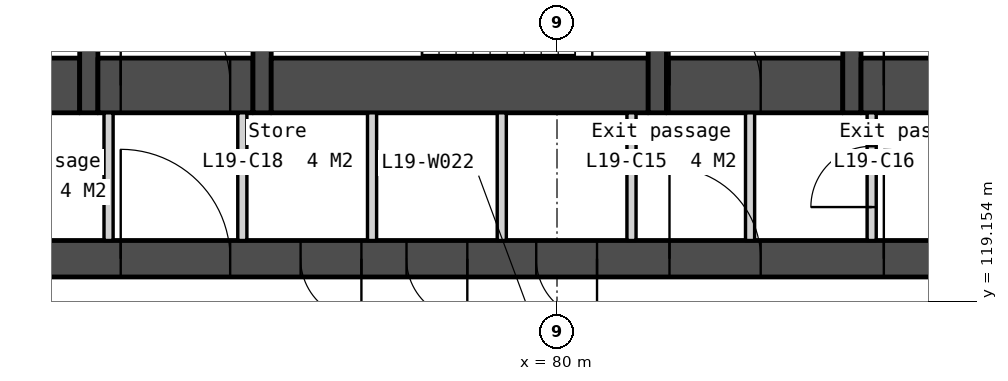
"""IFC4 building model, lengths in metres.
Left out: names, types, materials, properties, quantities, classifications, styles, units other than length and angle.
Written with IfcOpenShell. Run it as: python <this file> out.ifc"""

import sys

from ifc_helpers import new_model, si_unit, direction, frame, frame_2d, origin, place, context, subcontext, project, spatial, polyline, rectangle, outline, extrude, element, fill, save


model = new_model("IFC4")
c1 = context("Model", 3, precision=1e-05, world=origin(), true_north=direction((0.0, 1.0)))
c2 = subcontext(c1, "Body", "Model", "MODEL_VIEW")
j1 = project(units=[si_unit("LENGTHUNIT", "METRE"), si_unit("PLANEANGLEUNIT", "RADIAN")], contexts=[c1])
p1 = place(None, origin())
s1 = spatial("IfcSite", under=j1, at=p1, CompositionType="ELEMENT")
p2 = place(p1, origin())
s2 = spatial("IfcBuilding", under=s1, at=p2, CompositionType="ELEMENT")
p3 = place(p2, frame((0.0, 0.0, 81.8)))
s3 = spatial("IfcBuildingStorey", under=s2, at=p3, CompositionType="ELEMENT", Elevation=81.8)
p4 = place(p3, frame((66.0, 119.85, 0.0), z_axis=(0.0, 0.0, 1.0), x_axis=(1.0, 0.0, 0.0)))
e1 = element("IfcWall", 1, at=p4, inside=s3, PredefinedType="SOLIDWALL", context=c2, shape_type="SweptSolid", body=[
    extrude(rectangle(XDim=28.0, YDim=0.6, at=frame_2d((14.0, 0.0))), origin(), (0.0, 0.0, 1.0), 3.35),
])
p5 = place(p4, frame((6.825, 0.0, 0.0)))
e2 = element("IfcOpeningElement", 2, at=p5, cuts=e1, PredefinedType="OPENING", context=c2, shape_type="SweptSolid", body=[
    extrude(rectangle(XDim=1.8, YDim=2.1, at=frame_2d((0.9, 1.05))), frame((0.0, 0.31, 0.0), z_axis=(0.0, -1.0, 0.0), x_axis=(1.0, 0.0, 0.0)), (0.0, 0.0, 1.0), 0.62),
])
p6 = place(p4, frame((15.85, 0.0, 0.0)))
e3 = element("IfcOpeningElement", 3, at=p6, cuts=e1, PredefinedType="OPENING", context=c2, shape_type="SweptSolid", body=[
    extrude(rectangle(XDim=1.5, YDim=2.1, at=frame_2d((0.75, 1.05))), frame((0.0, 0.31, 0.0), z_axis=(0.0, -1.0, 0.0), x_axis=(1.0, 0.0, 0.0)), (0.0, 0.0, 1.0), 0.62),
])
p7 = place(p4, frame((19.375, 0.0, 0.0)))
e4 = element("IfcOpeningElement", 4, at=p7, cuts=e1, PredefinedType="OPENING", context=c2, shape_type="SweptSolid", body=[
    extrude(rectangle(XDim=1.8, YDim=2.1, at=frame_2d((0.9, 1.05))), frame((0.0, 0.31, 0.0), z_axis=(0.0, -1.0, 0.0), x_axis=(1.0, 0.0, 0.0)), (0.0, 0.0, 1.0), 0.62),
])
p8 = place(p4, frame((4.425, 0.0, 0.0)))
e5 = element("IfcOpeningElement", 5, at=p8, cuts=e1, PredefinedType="OPENING", context=c2, shape_type="SweptSolid", body=[
    extrude(rectangle(XDim=1.0, YDim=2.1, at=frame_2d((0.5, 1.05))), frame((0.0, 0.31, 0.0), z_axis=(0.0, -1.0, 0.0), x_axis=(1.0, 0.0, 0.0)), (0.0, 0.0, 1.0), 0.62),
])
p9 = place(p4, frame((9.783, 0.0, 0.0)))
e6 = element("IfcOpeningElement", 6, at=p9, cuts=e1, PredefinedType="OPENING", context=c2, shape_type="SweptSolid", body=[
    extrude(rectangle(XDim=1.0, YDim=2.1, at=frame_2d((0.5, 1.05))), frame((0.0, 0.31, 0.0), z_axis=(0.0, -1.0, 0.0), x_axis=(1.0, 0.0, 0.0)), (0.0, 0.0, 1.0), 0.62),
])
p10 = place(p4, frame((11.525, 0.0, 0.0)))
e7 = element("IfcOpeningElement", 7, at=p10, cuts=e1, PredefinedType="OPENING", context=c2, shape_type="SweptSolid", body=[
    extrude(rectangle(XDim=1.0, YDim=2.1, at=frame_2d((0.5, 1.05))), frame((0.0, 0.31, 0.0), z_axis=(0.0, -1.0, 0.0), x_axis=(1.0, 0.0, 0.0)), (0.0, 0.0, 1.0), 0.62),
])
p11 = place(p4, frame((13.658, 0.0, 0.0)))
e8 = element("IfcOpeningElement", 8, at=p11, cuts=e1, PredefinedType="OPENING", context=c2, shape_type="SweptSolid", body=[
    extrude(rectangle(XDim=1.0, YDim=2.1, at=frame_2d((0.5, 1.05))), frame((0.0, 0.31, 0.0), z_axis=(0.0, -1.0, 0.0), x_axis=(1.0, 0.0, 0.0)), (0.0, 0.0, 1.0), 0.62),
])
p12 = place(p4, frame((21.725, 0.0, 0.0)))
e9 = element("IfcOpeningElement", 9, at=p12, cuts=e1, PredefinedType="OPENING", context=c2, shape_type="SweptSolid", body=[
    extrude(rectangle(XDim=1.0, YDim=2.1, at=frame_2d((0.5, 1.05))), frame((0.0, 0.31, 0.0), z_axis=(0.0, -1.0, 0.0), x_axis=(1.0, 0.0, 0.0)), (0.0, 0.0, 1.0), 0.62),
])
p13 = place(p4, frame((23.425, 0.0, 0.0)))
e10 = element("IfcOpeningElement", 10, at=p13, cuts=e1, PredefinedType="OPENING", context=c2, shape_type="SweptSolid", body=[
    extrude(rectangle(XDim=1.0, YDim=2.1, at=frame_2d((0.5, 1.05))), frame((0.0, 0.31, 0.0), z_axis=(0.0, -1.0, 0.0), x_axis=(1.0, 0.0, 0.0)), (0.0, 0.0, 1.0), 0.62),
])
p14 = place(p3, frame((69.6, 122.7, 0.0), z_axis=(0.0, 0.0, 1.0), x_axis=(1.0, 0.0, 0.0)))
e11 = element("IfcWall", 11, at=p14, inside=s3, PredefinedType="SOLIDWALL", context=c2, shape_type="SweptSolid", body=[
    extrude(rectangle(XDim=2.55, YDim=0.9, at=frame_2d((1.275, 0.0))), origin(), (0.0, 0.0, 1.0), 3.35),
])
p15 = place(p3, frame((72.3, 133.95, 0.0), z_axis=(0.0, 0.0, 1.0), x_axis=(0.0, -1.0, 0.0)))
e12 = element("IfcWall", 12, at=p15, inside=s3, PredefinedType="SOLIDWALL", context=c2, shape_type="SweptSolid", body=[
    extrude(rectangle(XDim=11.7, YDim=0.3, at=frame_2d((5.85, 0.0))), origin(), (0.0, 0.0, 1.0), 3.35),
])
p16 = place(p15, frame((6.95, 0.0, 0.0)))
e13 = element("IfcOpeningElement", 13, at=p16, cuts=e12, PredefinedType="OPENING", context=c2, shape_type="SweptSolid", body=[
    extrude(rectangle(XDim=1.1, YDim=2.1, at=frame_2d((0.55, 1.05))), frame((0.0, 0.16, 0.0), z_axis=(0.0, -1.0, 0.0), x_axis=(1.0, 0.0, 0.0)), (0.0, 0.0, 1.0), 0.32),
])
p17 = place(p15, frame((9.35, 0.0, 0.0)))
e14 = element("IfcOpeningElement", 14, at=p17, cuts=e12, PredefinedType="OPENING", context=c2, shape_type="SweptSolid", body=[
    extrude(rectangle(XDim=0.9, YDim=2.1, at=frame_2d((0.45, 1.05))), frame((0.0, 0.16, 0.0), z_axis=(0.0, -1.0, 0.0), x_axis=(1.0, 0.0, 0.0)), (0.0, 0.0, 1.0), 0.32),
])
p18 = place(p15, frame((5.1, 0.0, 0.0)))
e15 = element("IfcOpeningElement", 15, at=p18, cuts=e12, PredefinedType="OPENING", context=c2, shape_type="SweptSolid", body=[
    extrude(rectangle(XDim=1.0, YDim=2.1, at=frame_2d((0.5, 1.05))), frame((0.0, 0.16, 0.0), z_axis=(0.0, -1.0, 0.0), x_axis=(1.0, 0.0, 0.0)), (0.0, 0.0, 1.0), 0.32),
])
p19 = place(p3, frame((72.45, 122.7, 0.0), z_axis=(0.0, 0.0, 1.0), x_axis=(1.0, 0.0, 0.0)))
e16 = element("IfcWall", 16, at=p19, inside=s3, PredefinedType="SOLIDWALL", context=c2, shape_type="SweptSolid", body=[
    extrude(rectangle(XDim=2.55, YDim=0.9, at=frame_2d((1.275, 0.0))), origin(), (0.0, 0.0, 1.0), 3.35),
])
p20 = place(p19, frame((0.375, 0.0, 0.0)))
e17 = element("IfcOpeningElement", 17, at=p20, cuts=e16, PredefinedType="OPENING", context=c2, shape_type="SweptSolid", body=[
    extrude(rectangle(XDim=1.8, YDim=2.1, at=frame_2d((0.9, 1.05))), frame((0.0, 0.46, 0.0), z_axis=(0.0, -1.0, 0.0), x_axis=(1.0, 0.0, 0.0)), (0.0, 0.0, 1.0), 0.92),
])
for number, where, z_axis, x_axis in (
    (18, (72.625, 122.25, 0.0), (0.0, 0.0, 1.0), (0.0, -1.0, 0.0)),
    (19, (74.825, 122.25, 0.0), (0.0, 0.0, 1.0), (0.0, -1.0, 0.0)),
):
    element("IfcWall", number, at=place(p3, frame(where, z_axis=z_axis, x_axis=x_axis)), inside=s3, PredefinedType="PARTITIONING", context=c2, shape_type="SweptSolid", body=[
        extrude(rectangle(XDim=2.1, YDim=0.15, at=frame_2d((1.05, 0.0))), origin(), (0.0, 0.0, 1.0), 3.35),
    ])
p21 = place(p3, frame((75.15, 133.95, 0.0), z_axis=(0.0, 0.0, 1.0), x_axis=(0.0, -1.0, 0.0)))
e20 = element("IfcWall", 20, at=p21, inside=s3, PredefinedType="SOLIDWALL", context=c2, shape_type="SweptSolid", body=[
    extrude(rectangle(XDim=11.7, YDim=0.3, at=frame_2d((5.85, 0.0))), origin(), (0.0, 0.0, 1.0), 3.35),
])
p22 = place(p3, frame((75.3, 122.7, 0.0), z_axis=(0.0, 0.0, 1.0), x_axis=(1.0, 0.0, 0.0)))
e21 = element("IfcWall", 21, at=p22, inside=s3, PredefinedType="SOLIDWALL", context=c2, shape_type="SweptSolid", body=[
    extrude(rectangle(XDim=6.2, YDim=0.9, at=frame_2d((3.1, 0.0))), origin(), (0.0, 0.0, 1.0), 3.35),
])
for number, where, z_axis, x_axis in (
    (22, (76.958, 122.25, 0.0), (0.0, 0.0, 1.0), (0.0, -1.0, 0.0)),
    (23, (79.092, 122.25, 0.0), (0.0, 0.0, 1.0), (0.0, -1.0, 0.0)),
    (24, (81.225, 122.25, 0.0), (0.0, 0.0, 1.0), (0.0, -1.0, 0.0)),
):
    element("IfcWall", number, at=place(p3, frame(where, z_axis=z_axis, x_axis=x_axis)), inside=s3, PredefinedType="PARTITIONING", context=c2, shape_type="SweptSolid", body=[
        extrude(rectangle(XDim=2.1, YDim=0.15, at=frame_2d((1.05, 0.0))), origin(), (0.0, 0.0, 1.0), 3.35),
    ])
p23 = place(p3, frame((81.65, 125.7, 0.0), z_axis=(0.0, 0.0, 1.0), x_axis=(0.0, -1.0, 0.0)))
e25 = element("IfcWall", 25, at=p23, inside=s3, PredefinedType="SOLIDWALL", context=c2, shape_type="SweptSolid", body=[
    extrude(rectangle(XDim=3.45, YDim=0.3, at=frame_2d((1.725, 0.0))), origin(), (0.0, 0.0, 1.0), 3.35),
])
p24 = place(p23, frame((0.75, 0.0, 0.0)))
e26 = element("IfcOpeningElement", 26, at=p24, cuts=e25, PredefinedType="OPENING", context=c2, shape_type="SweptSolid", body=[
    extrude(rectangle(XDim=1.0, YDim=2.1, at=frame_2d((0.5, 1.05))), frame((0.0, 0.16, 0.0), z_axis=(0.0, -1.0, 0.0), x_axis=(1.0, 0.0, 0.0)), (0.0, 0.0, 1.0), 0.32),
])
p25 = place(p3, frame((81.8, 122.7, 0.0), z_axis=(0.0, 0.0, 1.0), x_axis=(1.0, 0.0, 0.0)))
e27 = element("IfcWall", 27, at=p25, inside=s3, PredefinedType="SOLIDWALL", context=c2, shape_type="SweptSolid", body=[
    extrude(rectangle(XDim=2.9, YDim=0.9, at=frame_2d((1.45, 0.0))), origin(), (0.0, 0.0, 1.0), 3.35),
])
p26 = place(p25, frame((0.05, 0.0, 0.0)))
e28 = element("IfcOpeningElement", 28, at=p26, cuts=e27, PredefinedType="OPENING", context=c2, shape_type="SweptSolid", body=[
    extrude(rectangle(XDim=1.5, YDim=2.1, at=frame_2d((0.75, 1.05))), frame((0.0, 0.46, 0.0), z_axis=(0.0, -1.0, 0.0), x_axis=(1.0, 0.0, 0.0)), (0.0, 0.0, 1.0), 0.92),
])
p27 = place(p3, frame((83.175, 122.25, 0.0), z_axis=(0.0, 0.0, 1.0), x_axis=(0.0, -1.0, 0.0)))
e29 = element("IfcWall", 29, at=p27, inside=s3, PredefinedType="PARTITIONING", context=c2, shape_type="SweptSolid", body=[
    extrude(rectangle(XDim=2.1, YDim=0.15, at=frame_2d((1.05, 0.0))), origin(), (0.0, 0.0, 1.0), 3.35),
])
p28 = place(p3, frame((84.85, 133.95, 0.0), z_axis=(0.0, 0.0, 1.0), x_axis=(0.0, -1.0, 0.0)))
e30 = element("IfcWall", 30, at=p28, inside=s3, PredefinedType="SOLIDWALL", context=c2, shape_type="SweptSolid", body=[
    extrude(rectangle(XDim=11.7, YDim=0.3, at=frame_2d((5.85, 0.0))), origin(), (0.0, 0.0, 1.0), 3.35),
])
p29 = place(p3, frame((85.0, 122.7, 0.0), z_axis=(0.0, 0.0, 1.0), x_axis=(1.0, 0.0, 0.0)))
e31 = element("IfcWall", 31, at=p29, inside=s3, PredefinedType="SOLIDWALL", context=c2, shape_type="SweptSolid", body=[
    extrude(rectangle(XDim=2.55, YDim=0.9, at=frame_2d((1.275, 0.0))), origin(), (0.0, 0.0, 1.0), 3.35),
])
p30 = place(p29, frame((0.375, 0.0, 0.0)))
e32 = element("IfcOpeningElement", 32, at=p30, cuts=e31, PredefinedType="OPENING", context=c2, shape_type="SweptSolid", body=[
    extrude(rectangle(XDim=1.8, YDim=2.1, at=frame_2d((0.9, 1.05))), frame((0.0, 0.46, 0.0), z_axis=(0.0, -1.0, 0.0), x_axis=(1.0, 0.0, 0.0)), (0.0, 0.0, 1.0), 0.92),
])
p31 = place(p3, frame((85.175, 122.25, 0.0), z_axis=(0.0, 0.0, 1.0), x_axis=(0.0, -1.0, 0.0)))
e33 = element("IfcWall", 33, at=p31, inside=s3, PredefinedType="PARTITIONING", context=c2, shape_type="SweptSolid", body=[
    extrude(rectangle(XDim=2.1, YDim=0.15, at=frame_2d((1.05, 0.0))), origin(), (0.0, 0.0, 1.0), 3.35),
])
p32 = place(p31, frame((0.55, 0.0, 0.0)))
e34 = element("IfcOpeningElement", 34, at=p32, cuts=e33, PredefinedType="OPENING", context=c2, shape_type="SweptSolid", body=[
    extrude(rectangle(XDim=1.0, YDim=2.1, at=frame_2d((0.5, 1.05))), frame((0.0, 0.085, 0.0), z_axis=(0.0, -1.0, 0.0), x_axis=(1.0, 0.0, 0.0)), (0.0, 0.0, 1.0), 0.17),
])
p33 = place(p3, frame((56.073, 130.263, -0.45), z_axis=(0.0, 0.0, 1.0), x_axis=(0.500000478905, -0.866025127289, 0.0)))
e35 = element("IfcWall", 35, at=p33, inside=s3, PredefinedType="SOLIDWALL", context=c2, shape_type="SweptSolid", body=[
    extrude(outline(polyline([(42.643, 0.0), (42.643, 3.8), (0.0, 3.8), (0.0, 0.0), (42.643, 0.0)])), frame((0.0, 0.225, 0.0), z_axis=(0.0, -1.0, 0.0), x_axis=(1.0, 0.0, 0.0)), (0.0, 0.0, 1.0), 0.45),
])
p34 = place(p33, frame((2.814, 0.0, 1.35)))
e36 = element("IfcOpeningElement", 36, at=p34, cuts=e35, PredefinedType="OPENING", context=c2, shape_type="SweptSolid", body=[
    extrude(rectangle(XDim=1.2, YDim=1.5, at=frame_2d((0.6, 0.75))), frame((0.0, 0.235, 0.0), z_axis=(0.0, -1.0, 0.0), x_axis=(1.0, 0.0, 0.0)), (0.0, 0.0, 1.0), 0.47),
])
p35 = place(p33, frame((4.514, 0.0, 1.35)))
e37 = element("IfcOpeningElement", 37, at=p35, cuts=e35, PredefinedType="OPENING", context=c2, shape_type="SweptSolid", body=[
    extrude(rectangle(XDim=1.2, YDim=1.5, at=frame_2d((0.6, 0.75))), frame((0.0, 0.235, 0.0), z_axis=(0.0, -1.0, 0.0), x_axis=(1.0, 0.0, 0.0)), (0.0, 0.0, 1.0), 0.47),
])
p36 = place(p33, frame((11.343, 0.0, 1.35)))
e38 = element("IfcOpeningElement", 38, at=p36, cuts=e35, PredefinedType="OPENING", context=c2, shape_type="SweptSolid", body=[
    extrude(rectangle(XDim=1.2, YDim=1.5, at=frame_2d((0.6, 0.75))), frame((0.0, 0.235, 0.0), z_axis=(0.0, -1.0, 0.0), x_axis=(1.0, 0.0, 0.0)), (0.0, 0.0, 1.0), 0.47),
])
p37 = place(p33, frame((13.043, 0.0, 1.35)))
e39 = element("IfcOpeningElement", 39, at=p37, cuts=e35, PredefinedType="OPENING", context=c2, shape_type="SweptSolid", body=[
    extrude(rectangle(XDim=1.2, YDim=1.5, at=frame_2d((0.6, 0.75))), frame((0.0, 0.235, 0.0), z_axis=(0.0, -1.0, 0.0), x_axis=(1.0, 0.0, 0.0)), (0.0, 0.0, 1.0), 0.47),
])
p38 = place(p33, frame((19.872, 0.0, 1.35)))
e40 = element("IfcOpeningElement", 40, at=p38, cuts=e35, PredefinedType="OPENING", context=c2, shape_type="SweptSolid", body=[
    extrude(rectangle(XDim=1.2, YDim=1.5, at=frame_2d((0.6, 0.75))), frame((0.0, 0.235, 0.0), z_axis=(0.0, -1.0, 0.0), x_axis=(1.0, 0.0, 0.0)), (0.0, 0.0, 1.0), 0.47),
])
p39 = place(p33, frame((21.572, 0.0, 1.35)))
e41 = element("IfcOpeningElement", 41, at=p39, cuts=e35, PredefinedType="OPENING", context=c2, shape_type="SweptSolid", body=[
    extrude(rectangle(XDim=1.2, YDim=1.5, at=frame_2d((0.6, 0.75))), frame((0.0, 0.235, 0.0), z_axis=(0.0, -1.0, 0.0), x_axis=(1.0, 0.0, 0.0)), (0.0, 0.0, 1.0), 0.47),
])
p40 = place(p33, frame((28.4, 0.0, 1.35)))
e42 = element("IfcOpeningElement", 42, at=p40, cuts=e35, PredefinedType="OPENING", context=c2, shape_type="SweptSolid", body=[
    extrude(rectangle(XDim=1.2, YDim=1.5, at=frame_2d((0.6, 0.75))), frame((0.0, 0.235, 0.0), z_axis=(0.0, -1.0, 0.0), x_axis=(1.0, 0.0, 0.0)), (0.0, 0.0, 1.0), 0.47),
])
p41 = place(p33, frame((30.1, 0.0, 1.35)))
e43 = element("IfcOpeningElement", 43, at=p41, cuts=e35, PredefinedType="OPENING", context=c2, shape_type="SweptSolid", body=[
    extrude(rectangle(XDim=1.2, YDim=1.5, at=frame_2d((0.6, 0.75))), frame((0.0, 0.235, 0.0), z_axis=(0.0, -1.0, 0.0), x_axis=(1.0, 0.0, 0.0)), (0.0, 0.0, 1.0), 0.47),
])
p42 = place(p33, frame((36.929, 0.0, 1.35)))
e44 = element("IfcOpeningElement", 44, at=p42, cuts=e35, PredefinedType="OPENING", context=c2, shape_type="SweptSolid", body=[
    extrude(rectangle(XDim=1.2, YDim=1.5, at=frame_2d((0.6, 0.75))), frame((0.0, 0.235, 0.0), z_axis=(0.0, -1.0, 0.0), x_axis=(1.0, 0.0, 0.0)), (0.0, 0.0, 1.0), 0.47),
])
p43 = place(p33, frame((38.629, 0.0, 1.35)))
e45 = element("IfcOpeningElement", 45, at=p43, cuts=e35, PredefinedType="OPENING", context=c2, shape_type="SweptSolid", body=[
    extrude(rectangle(XDim=1.2, YDim=1.5, at=frame_2d((0.6, 0.75))), frame((0.0, 0.235, 0.0), z_axis=(0.0, -1.0, 0.0), x_axis=(1.0, 0.0, 0.0)), (0.0, 0.0, 1.0), 0.47),
])
p44 = place(p3, frame((82.605, 93.333, -0.45), z_axis=(0.0, 0.0, 1.0), x_axis=(0.500000478905, 0.866025127289, 0.0)))
e46 = element("IfcWall", 46, at=p44, inside=s3, PredefinedType="SOLIDWALL", context=c2, shape_type="SweptSolid", body=[
    extrude(outline(polyline([(42.643, 0.0), (42.643, 3.8), (0.0, 3.8), (0.0, 0.0), (42.643, 0.0)])), frame((0.0, 0.225, 0.0), z_axis=(0.0, -1.0, 0.0), x_axis=(1.0, 0.0, 0.0)), (0.0, 0.0, 1.0), 0.45),
])
p45 = place(p44, frame((2.814, 0.0, 1.35)))
e47 = element("IfcOpeningElement", 47, at=p45, cuts=e46, PredefinedType="OPENING", context=c2, shape_type="SweptSolid", body=[
    extrude(rectangle(XDim=1.2, YDim=1.5, at=frame_2d((0.6, 0.75))), frame((0.0, 0.235, 0.0), z_axis=(0.0, -1.0, 0.0), x_axis=(1.0, 0.0, 0.0)), (0.0, 0.0, 1.0), 0.47),
])
p46 = place(p44, frame((4.514, 0.0, 1.35)))
e48 = element("IfcOpeningElement", 48, at=p46, cuts=e46, PredefinedType="OPENING", context=c2, shape_type="SweptSolid", body=[
    extrude(rectangle(XDim=1.2, YDim=1.5, at=frame_2d((0.6, 0.75))), frame((0.0, 0.235, 0.0), z_axis=(0.0, -1.0, 0.0), x_axis=(1.0, 0.0, 0.0)), (0.0, 0.0, 1.0), 0.47),
])
p47 = place(p44, frame((11.343, 0.0, 1.35)))
e49 = element("IfcOpeningElement", 49, at=p47, cuts=e46, PredefinedType="OPENING", context=c2, shape_type="SweptSolid", body=[
    extrude(rectangle(XDim=1.2, YDim=1.5, at=frame_2d((0.6, 0.75))), frame((0.0, 0.235, 0.0), z_axis=(0.0, -1.0, 0.0), x_axis=(1.0, 0.0, 0.0)), (0.0, 0.0, 1.0), 0.47),
])
p48 = place(p44, frame((13.043, 0.0, 1.35)))
e50 = element("IfcOpeningElement", 50, at=p48, cuts=e46, PredefinedType="OPENING", context=c2, shape_type="SweptSolid", body=[
    extrude(rectangle(XDim=1.2, YDim=1.5, at=frame_2d((0.6, 0.75))), frame((0.0, 0.235, 0.0), z_axis=(0.0, -1.0, 0.0), x_axis=(1.0, 0.0, 0.0)), (0.0, 0.0, 1.0), 0.47),
])
p49 = place(p44, frame((19.872, 0.0, 1.35)))
e51 = element("IfcOpeningElement", 51, at=p49, cuts=e46, PredefinedType="OPENING", context=c2, shape_type="SweptSolid", body=[
    extrude(rectangle(XDim=1.2, YDim=1.5, at=frame_2d((0.6, 0.75))), frame((0.0, 0.235, 0.0), z_axis=(0.0, -1.0, 0.0), x_axis=(1.0, 0.0, 0.0)), (0.0, 0.0, 1.0), 0.47),
])
p50 = place(p44, frame((21.572, 0.0, 1.35)))
e52 = element("IfcOpeningElement", 52, at=p50, cuts=e46, PredefinedType="OPENING", context=c2, shape_type="SweptSolid", body=[
    extrude(rectangle(XDim=1.2, YDim=1.5, at=frame_2d((0.6, 0.75))), frame((0.0, 0.235, 0.0), z_axis=(0.0, -1.0, 0.0), x_axis=(1.0, 0.0, 0.0)), (0.0, 0.0, 1.0), 0.47),
])
p51 = place(p44, frame((28.4, 0.0, 1.35)))
e53 = element("IfcOpeningElement", 53, at=p51, cuts=e46, PredefinedType="OPENING", context=c2, shape_type="SweptSolid", body=[
    extrude(rectangle(XDim=1.2, YDim=1.5, at=frame_2d((0.6, 0.75))), frame((0.0, 0.235, 0.0), z_axis=(0.0, -1.0, 0.0), x_axis=(1.0, 0.0, 0.0)), (0.0, 0.0, 1.0), 0.47),
])
p52 = place(p44, frame((30.1, 0.0, 1.35)))
e54 = element("IfcOpeningElement", 54, at=p52, cuts=e46, PredefinedType="OPENING", context=c2, shape_type="SweptSolid", body=[
    extrude(rectangle(XDim=1.2, YDim=1.5, at=frame_2d((0.6, 0.75))), frame((0.0, 0.235, 0.0), z_axis=(0.0, -1.0, 0.0), x_axis=(1.0, 0.0, 0.0)), (0.0, 0.0, 1.0), 0.47),
])
p53 = place(p44, frame((36.929, 0.0, 1.35)))
e55 = element("IfcOpeningElement", 55, at=p53, cuts=e46, PredefinedType="OPENING", context=c2, shape_type="SweptSolid", body=[
    extrude(rectangle(XDim=1.2, YDim=1.5, at=frame_2d((0.6, 0.75))), frame((0.0, 0.235, 0.0), z_axis=(0.0, -1.0, 0.0), x_axis=(1.0, 0.0, 0.0)), (0.0, 0.0, 1.0), 0.47),
])
p54 = place(p44, frame((38.629, 0.0, 1.35)))
e56 = element("IfcOpeningElement", 56, at=p54, cuts=e46, PredefinedType="OPENING", context=c2, shape_type="SweptSolid", body=[
    extrude(rectangle(XDim=1.2, YDim=1.5, at=frame_2d((0.6, 0.75))), frame((0.0, 0.235, 0.0), z_axis=(0.0, -1.0, 0.0), x_axis=(1.0, 0.0, 0.0)), (0.0, 0.0, 1.0), 0.47),
])
p55 = place(p30, origin())
e57 = element("IfcDoor", 57, at=p55, inside=s3, OperationType="DOUBLE_DOOR_DOUBLE_SWING", PredefinedType="DOOR", context=c2, shape_type="SweptSolid", body=[
    extrude(rectangle(XDim=1.8, YDim=2.1, at=frame_2d((0.9, 1.05))), frame((0.0, 0.025, 0.0), z_axis=(0.0, -1.0, 0.0), x_axis=(1.0, 0.0, 0.0)), (0.0, 0.0, 1.0), 0.05),
])
fill(e32, e57)
p56 = place(p20, origin())
e58 = element("IfcDoor", 58, at=p56, inside=s3, OperationType="DOUBLE_DOOR_DOUBLE_SWING", PredefinedType="DOOR", context=c2, shape_type="SweptSolid", body=[
    extrude(rectangle(XDim=1.8, YDim=2.1, at=frame_2d((0.9, 1.05))), frame((0.0, 0.025, 0.0), z_axis=(0.0, -1.0, 0.0), x_axis=(1.0, 0.0, 0.0)), (0.0, 0.0, 1.0), 0.05),
])
fill(e17, e58)
p57 = place(p26, origin())
e59 = element("IfcDoor", 59, at=p57, inside=s3, OperationType="DOUBLE_DOOR_DOUBLE_SWING", PredefinedType="DOOR", context=c2, shape_type="SweptSolid", body=[
    extrude(rectangle(XDim=1.5, YDim=2.1, at=frame_2d((0.75, 1.05))), frame((0.0, 0.025, 0.0), z_axis=(0.0, -1.0, 0.0), x_axis=(1.0, 0.0, 0.0)), (0.0, 0.0, 1.0), 0.05),
])
fill(e28, e59)
p58 = place(p5, origin())
e60 = element("IfcDoor", 60, at=p58, inside=s3, OperationType="DOUBLE_DOOR_DOUBLE_SWING", PredefinedType="DOOR", context=c2, shape_type="SweptSolid", body=[
    extrude(rectangle(XDim=1.8, YDim=2.1, at=frame_2d((0.9, 1.05))), frame((0.0, 0.025, 0.0), z_axis=(0.0, -1.0, 0.0), x_axis=(1.0, 0.0, 0.0)), (0.0, 0.0, 1.0), 0.05),
])
fill(e2, e60)
p59 = place(p6, origin())
e61 = element("IfcDoor", 61, at=p59, inside=s3, OperationType="DOUBLE_DOOR_DOUBLE_SWING", PredefinedType="DOOR", context=c2, shape_type="SweptSolid", body=[
    extrude(rectangle(XDim=1.5, YDim=2.1, at=frame_2d((0.75, 1.05))), frame((0.0, 0.025, 0.0), z_axis=(0.0, -1.0, 0.0), x_axis=(1.0, 0.0, 0.0)), (0.0, 0.0, 1.0), 0.05),
])
fill(e3, e61)
p60 = place(p7, origin())
e62 = element("IfcDoor", 62, at=p60, inside=s3, OperationType="DOUBLE_DOOR_DOUBLE_SWING", PredefinedType="DOOR", context=c2, shape_type="SweptSolid", body=[
    extrude(rectangle(XDim=1.8, YDim=2.1, at=frame_2d((0.9, 1.05))), frame((0.0, 0.025, 0.0), z_axis=(0.0, -1.0, 0.0), x_axis=(1.0, 0.0, 0.0)), (0.0, 0.0, 1.0), 0.05),
])
fill(e4, e62)
p61 = place(p9, origin())
e63 = element("IfcDoor", 63, at=p61, inside=s3, OperationType="SINGLE_SWING_RIGHT", PredefinedType="DOOR", context=c2, shape_type="SweptSolid", body=[
    extrude(rectangle(XDim=1.0, YDim=2.1, at=frame_2d((0.5, 1.05))), frame((0.0, 0.025, 0.0), z_axis=(0.0, -1.0, 0.0), x_axis=(1.0, 0.0, 0.0)), (0.0, 0.0, 1.0), 0.05),
])
fill(e6, e63)
p62 = place(p10, origin())
e64 = element("IfcDoor", 64, at=p62, inside=s3, OperationType="SINGLE_SWING_RIGHT", PredefinedType="DOOR", context=c2, shape_type="SweptSolid", body=[
    extrude(rectangle(XDim=1.0, YDim=2.1, at=frame_2d((0.5, 1.05))), frame((0.0, 0.025, 0.0), z_axis=(0.0, -1.0, 0.0), x_axis=(1.0, 0.0, 0.0)), (0.0, 0.0, 1.0), 0.05),
])
fill(e7, e64)
p63 = place(p11, origin())
e65 = element("IfcDoor", 65, at=p63, inside=s3, OperationType="SINGLE_SWING_RIGHT", PredefinedType="DOOR", context=c2, shape_type="SweptSolid", body=[
    extrude(rectangle(XDim=1.0, YDim=2.1, at=frame_2d((0.5, 1.05))), frame((0.0, 0.025, 0.0), z_axis=(0.0, -1.0, 0.0), x_axis=(1.0, 0.0, 0.0)), (0.0, 0.0, 1.0), 0.05),
])
fill(e8, e65)
p64 = place(p32, origin())
e66 = element("IfcDoor", 66, at=p64, inside=s3, OperationType="SINGLE_SWING_RIGHT", PredefinedType="DOOR", context=c2, shape_type="SweptSolid", body=[
    extrude(rectangle(XDim=1.0, YDim=2.1, at=frame_2d((0.5, 1.05))), frame((0.0, 0.025, 0.0), z_axis=(0.0, -1.0, 0.0), x_axis=(1.0, 0.0, 0.0)), (0.0, 0.0, 1.0), 0.05),
])
fill(e34, e66)
save(model, sys.argv[1])
